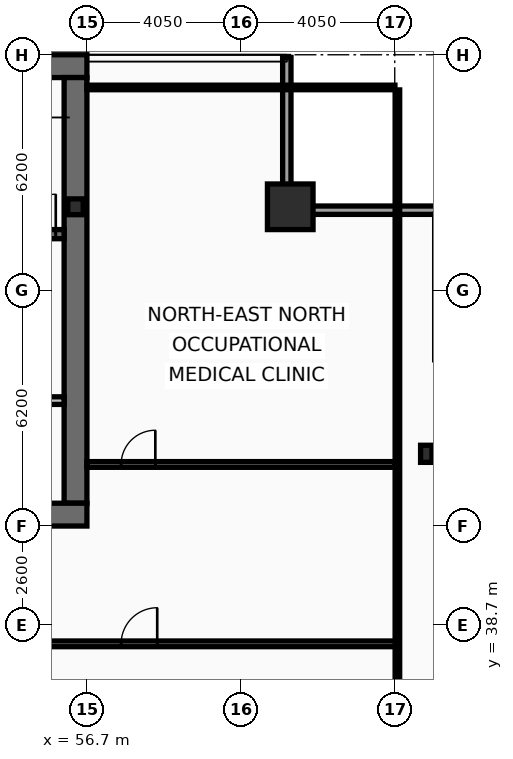
"""IFC4 building model, lengths in metres.
Left out: names, types, materials, properties, quantities, classifications, styles, units other than length and angle.
Written with IfcOpenShell. Run it as: python <this file> out.ifc"""

import sys

from ifc_helpers import new_model, si_unit, direction, frame, frame_2d, origin, origin_2d, place, context, subcontext, project, spatial, rectangle, hollow_rectangle, i_section, extrude, element, fill, save


model = new_model("IFC4")
c1 = context("Model", 3, precision=1e-05, world=origin(), true_north=direction((0.0, 1.0)))
c2 = subcontext(c1, "Body", "Model", "MODEL_VIEW")
j1 = project(units=[si_unit("LENGTHUNIT", "METRE"), si_unit("PLANEANGLEUNIT", "RADIAN")], contexts=[c1])
p1 = place(None, origin())
s1 = spatial("IfcSite", under=j1, at=p1, CompositionType="ELEMENT")
p2 = place(p1, origin())
s2 = spatial("IfcBuilding", under=s1, at=p2, CompositionType="ELEMENT")
p3 = place(p2, frame((0.0, 0.0, 199.4)))
s3 = spatial("IfcBuildingStorey", under=s2, at=p3, CompositionType="ELEMENT", Elevation=199.4)
p4 = place(p3, frame((16.2, 53.4, 0.0), z_axis=(0.0, 0.0, 1.0), x_axis=(1.0, 0.0, 0.0)))
e1 = element("IfcWall", 1, at=p4, inside=s3, PredefinedType="SHEAR", context=c2, shape_type="SweptSolid", body=[
    extrude(rectangle(XDim=40.5, YDim=0.6, at=frame_2d((20.25, 0.0))), origin(), (0.0, 0.0, 1.0), 3.44),
])
p5 = place(p3, frame((56.4, 53.1, 0.0), z_axis=(0.0, 0.0, 1.0), x_axis=(0.0, -1.0, 0.0)))
e2 = element("IfcWall", 2, at=p5, inside=s3, PredefinedType="SHEAR", context=c2, shape_type="SweptSolid", body=[
    extrude(rectangle(XDim=11.2, YDim=0.6, at=frame_2d((5.6, 0.0))), origin(), (0.0, 0.0, 1.0), 3.44),
])
p6 = place(p3, frame((56.7, 41.6, 0.0), z_axis=(0.0, 0.0, 1.0), x_axis=(-1.0, 0.0, 0.0)))
e3 = element("IfcWall", 3, at=p6, inside=s3, PredefinedType="SHEAR", context=c2, shape_type="SweptSolid", body=[
    extrude(rectangle(XDim=2.45, YDim=0.6, at=frame_2d((1.225, 0.0))), origin(), (0.0, 0.0, 1.0), 3.44),
])
p7 = place(p3, frame((48.63, 48.98, 0.0), z_axis=(0.0, 0.0, 1.0), x_axis=(1.0, 0.0, 0.0)))
e4 = element("IfcWall", 4, at=p7, inside=s3, PredefinedType="SHEAR", context=c2, shape_type="SweptSolid", body=[
    extrude(rectangle(XDim=7.47, YDim=0.24, at=frame_2d((3.735, 0.0))), origin(), (0.0, 0.0, 1.0), 3.44),
])
p8 = place(p7, frame((6.2, 0.0, 0.0)))
e5 = element("IfcOpeningElement", 5, at=p8, cuts=e4, PredefinedType="OPENING", context=c2, shape_type="SweptSolid", body=[
    extrude(rectangle(XDim=1.05, YDim=2.15, at=frame_2d((0.525, 1.075))), frame((0.0, 0.13, 0.0), z_axis=(0.0, -1.0, 0.0), x_axis=(1.0, 0.0, 0.0)), (0.0, 0.0, 1.0), 0.26),
])
p9 = place(p3, frame((62.05, 49.7, 0.0), z_axis=(0.0, 0.0, 1.0), x_axis=(1.0, 0.0, 0.0)))
e6 = element("IfcColumn", 6, at=p9, inside=s3, PredefinedType="COLUMN", context=c2, shape_type="SweptSolid", body=[
    extrude(hollow_rectangle(XDim=1.2, YDim=1.2, WallThickness=0.06, at=origin_2d()), origin(), (0.0, 0.0, 1.0), 3.6),
])
p10 = place(p3, frame((65.63, 43.2, 0.0), z_axis=(0.0, 0.0, 1.0), x_axis=(1.0, 0.0, 0.0)))
e7 = element("IfcColumn", 7, at=p10, inside=s3, PredefinedType="COLUMN", context=c2, shape_type="SweptSolid", body=[
    extrude(i_section(OverallWidth=0.3, OverallDepth=0.45, WebThickness=0.014, FlangeThickness=0.026, at=origin_2d()), origin(), (0.0, 0.0, 1.0), 3.6),
])
p11 = place(p3, frame((56.4, 49.7, 0.0), z_axis=(0.0, 0.0, 1.0), x_axis=(1.0, 0.0, 0.0)))
e8 = element("IfcColumn", 8, at=p11, inside=s3, PredefinedType="COLUMN", context=c2, shape_type="SweptSolid", body=[
    extrude(i_section(OverallWidth=0.406, OverallDepth=0.416, WebThickness=0.03, FlangeThickness=0.048, at=origin_2d()), origin(), (0.0, 0.0, 1.0), 3.6),
])
p12 = place(p3, frame((61.96, 53.63, 0.0), z_axis=(0.0, 0.0, 1.0), x_axis=(0.0, -1.0, 0.0)))
e9 = element("IfcWall", 9, at=p12, inside=s3, PredefinedType="SOLIDWALL", context=c2, shape_type="SweptSolid", body=[
    extrude(rectangle(XDim=3.91, YDim=0.22, at=frame_2d((1.955, 0.0))), origin(), (0.0, 0.0, 1.0), 2.83),
])
p13 = place(p3, frame((61.85, 49.61, 0.0), z_axis=(0.0, 0.0, 1.0), x_axis=(1.0, 0.0, 0.0)))
e10 = element("IfcWall", 10, at=p13, inside=s3, PredefinedType="SOLIDWALL", context=c2, shape_type="SweptSolid", body=[
    extrude(rectangle(XDim=4.22, YDim=0.22, at=frame_2d((2.11, 0.0))), origin(), (0.0, 0.0, 1.0), 2.83),
])
p14 = place(p3, frame((51.9, 44.6, 0.0), z_axis=(0.0, 0.0, 1.0), x_axis=(1.0, 0.0, 0.0)))
e11 = element("IfcWall", 11, at=p14, inside=s3, PredefinedType="PARTITIONING", context=c2, shape_type="SweptSolid", body=[
    extrude(rectangle(XDim=4.2, YDim=0.2, at=frame_2d((2.1, 0.0))), origin(), (0.0, 0.0, 1.0), 3.44),
])
p15 = place(p14, frame((1.15, 0.0, 0.0)))
e12 = element("IfcOpeningElement", 12, at=p15, cuts=e11, PredefinedType="OPENING", context=c2, shape_type="SweptSolid", body=[
    extrude(rectangle(XDim=1.05, YDim=2.15, at=frame_2d((0.525, 1.075))), frame((0.0, 0.11, 0.0), z_axis=(0.0, -1.0, 0.0), x_axis=(1.0, 0.0, 0.0)), (0.0, 0.0, 1.0), 0.22),
])
p16 = place(p3, frame((54.35, 38.2, 0.0), z_axis=(0.0, 0.0, 1.0), x_axis=(1.0, 0.0, 0.0)))
e13 = element("IfcWall", 13, at=p16, inside=s3, PredefinedType="PARTITIONING", context=c2, shape_type="SweptSolid", body=[
    extrude(rectangle(XDim=10.52, YDim=0.15, at=frame_2d((5.26, 0.0))), origin(), (0.0, 0.0, 1.0), 2.73),
])
p17 = place(p16, frame((3.25, 0.0, 0.0)))
e14 = element("IfcOpeningElement", 14, at=p17, cuts=e13, PredefinedType="OPENING", context=c2, shape_type="SweptSolid", body=[
    extrude(rectangle(XDim=0.95, YDim=2.05, at=frame_2d((0.475, 1.025))), frame((0.0, 0.085, 0.0), z_axis=(0.0, -1.0, 0.0), x_axis=(1.0, 0.0, 0.0)), (0.0, 0.0, 1.0), 0.17),
])
p18 = place(p3, frame((56.7, 42.92, 0.0), z_axis=(0.0, 0.0, 1.0), x_axis=(1.0, 0.0, 0.0)))
e15 = element("IfcWall", 15, at=p18, inside=s3, PredefinedType="PARTITIONING", context=c2, shape_type="SweptSolid", body=[
    extrude(rectangle(XDim=8.105, YDim=0.15, at=frame_2d((4.052, 0.0))), origin(), (0.0, 0.0, 1.0), 2.73),
])
p19 = place(p18, frame((0.9, 0.0, 0.0)))
e16 = element("IfcOpeningElement", 16, at=p19, cuts=e15, PredefinedType="OPENING", context=c2, shape_type="SweptSolid", body=[
    extrude(rectangle(XDim=0.9, YDim=2.05, at=frame_2d((0.45, 1.025))), frame((0.0, 0.085, 0.0), z_axis=(0.0, -1.0, 0.0), x_axis=(1.0, 0.0, 0.0)), (0.0, 0.0, 1.0), 0.17),
])
p20 = place(p3, frame((64.87, 10.665, 0.0), z_axis=(0.0, 0.0, 1.0), x_axis=(0.0, 1.0, 0.0)))
e17 = element("IfcWall", 17, at=p20, inside=s3, PredefinedType="PARTITIONING", context=c2, shape_type="SweptSolid", body=[
    extrude(rectangle(XDim=42.11, YDim=0.12, at=frame_2d((21.055, 0.0))), origin(), (0.0, 0.0, 1.0), 2.73),
])
p21 = place(p3, frame((56.7, 52.84, 0.0), z_axis=(0.0, 0.0, 1.0), x_axis=(1.0, 0.0, 0.0)))
e18 = element("IfcWall", 18, at=p21, inside=s3, PredefinedType="PARTITIONING", context=c2, shape_type="SweptSolid", body=[
    extrude(rectangle(XDim=8.105, YDim=0.12, at=frame_2d((4.052, 0.0))), origin(), (0.0, 0.0, 1.0), 3.44),
])
p22 = place(p8, origin())
e19 = element("IfcDoor", 19, at=p22, inside=s3, OperationType="SINGLE_SWING_RIGHT", PredefinedType="DOOR", context=c2, shape_type="SweptSolid", body=[
    extrude(rectangle(XDim=1.05, YDim=2.15, at=frame_2d((0.525, 1.075))), frame((0.0, 0.025, 0.0), z_axis=(0.0, -1.0, 0.0), x_axis=(1.0, 0.0, 0.0)), (0.0, 0.0, 1.0), 0.05),
])
fill(e5, e19)
p23 = place(p17, origin())
e20 = element("IfcDoor", 20, at=p23, inside=s3, OperationType="SINGLE_SWING_RIGHT", PredefinedType="DOOR", context=c2, shape_type="SweptSolid", body=[
    extrude(rectangle(XDim=0.95, YDim=2.05, at=frame_2d((0.475, 1.025))), frame((0.0, 0.025, 0.0), z_axis=(0.0, -1.0, 0.0), x_axis=(1.0, 0.0, 0.0)), (0.0, 0.0, 1.0), 0.05),
])
fill(e14, e20)
p24 = place(p19, origin())
e21 = element("IfcDoor", 21, at=p24, inside=s3, OperationType="SINGLE_SWING_RIGHT", PredefinedType="DOOR", context=c2, shape_type="SweptSolid", body=[
    extrude(rectangle(XDim=0.9, YDim=2.05, at=frame_2d((0.45, 1.025))), frame((0.0, 0.025, 0.0), z_axis=(0.0, -1.0, 0.0), x_axis=(1.0, 0.0, 0.0)), (0.0, 0.0, 1.0), 0.05),
])
fill(e16, e21)
save(model, sys.argv[1])
